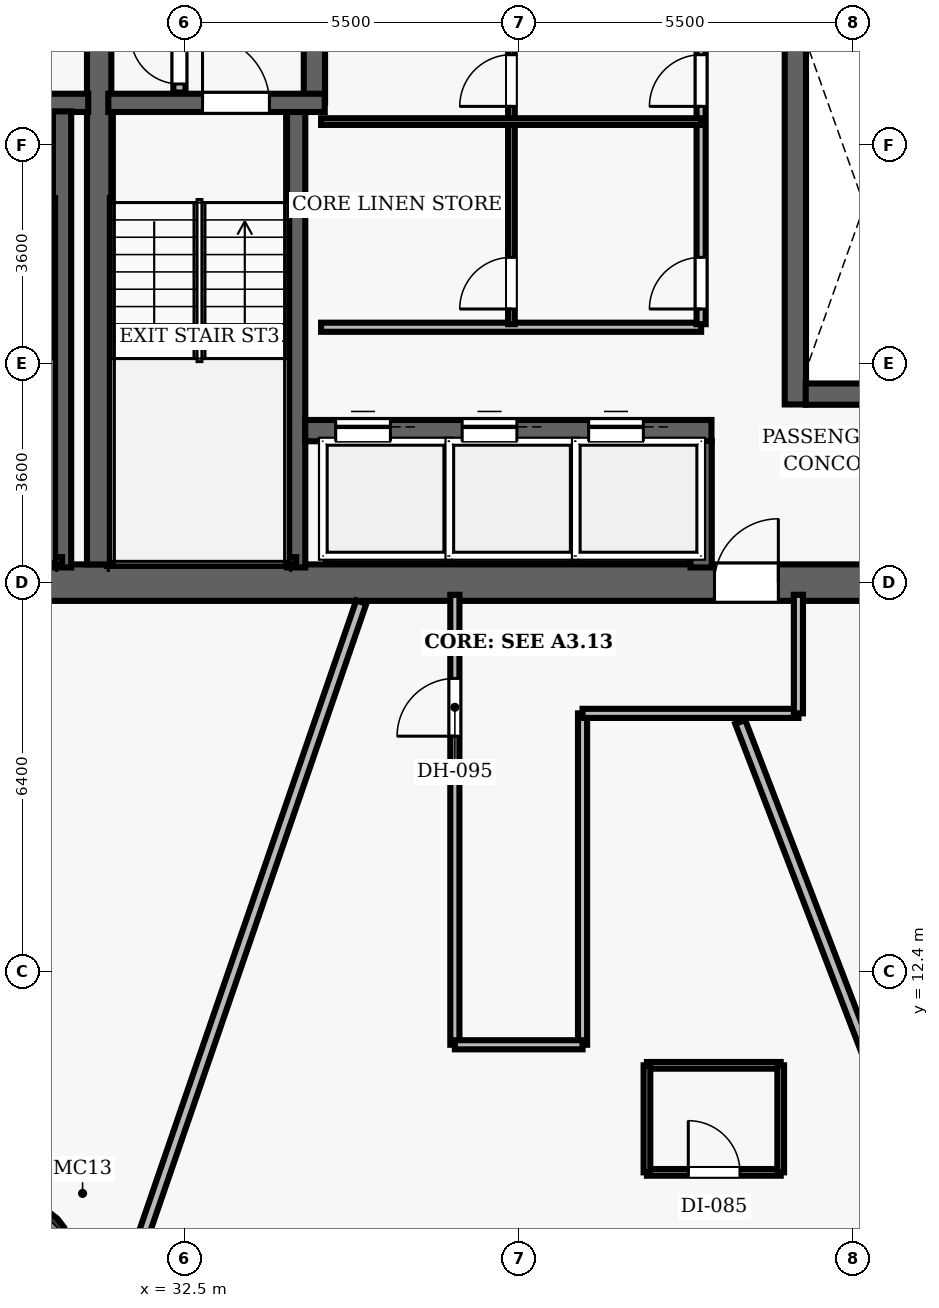
"""IFC4 building model, lengths in metres.
Left out: names, types, materials, properties, quantities, classifications, styles, units other than length and angle.
Written with IfcOpenShell. Run it as: python <this file> out.ifc"""

import sys

from ifc_helpers import new_model, si_unit, direction, frame, frame_2d, origin, origin_2d, place, context, subcontext, project, spatial, rectangle, hollow_circle, extrude, element, fill, save


model = new_model("IFC4")
c1 = context("Model", 3, precision=1e-05, world=origin(), true_north=direction((0.0, 1.0)))
c2 = subcontext(c1, "Body", "Model", "MODEL_VIEW")
j1 = project(units=[si_unit("LENGTHUNIT", "METRE"), si_unit("PLANEANGLEUNIT", "RADIAN")], contexts=[c1])
p1 = place(None, origin())
s1 = spatial("IfcSite", under=j1, at=p1, CompositionType="ELEMENT")
p2 = place(p1, origin())
s2 = spatial("IfcBuilding", under=s1, at=p2, CompositionType="ELEMENT")
p3 = place(p2, frame((0.0, 0.0, 113.3)))
s3 = spatial("IfcBuildingStorey", under=s2, at=p3, CompositionType="ELEMENT", Elevation=113.3)
p4 = place(p3, frame((26.7, 18.8, 0.0), z_axis=(0.0, 0.0, 1.0), x_axis=(1.0, 0.0, 0.0)))
e1 = element("IfcWall", 1, at=p4, inside=s3, PredefinedType="SHEAR", context=c2, shape_type="SweptSolid", body=[
    extrude(rectangle(XDim=22.6, YDim=0.6, at=frame_2d((11.3, 0.0))), origin(), (0.0, 0.0, 1.0), 3.5),
])
p5 = place(p4, frame((14.52, 0.0, 0.0)))
e2 = element("IfcOpeningElement", 2, at=p5, cuts=e1, PredefinedType="OPENING", context=c2, shape_type="SweptSolid", body=[
    extrude(rectangle(XDim=1.05, YDim=2.15, at=frame_2d((0.525, 1.075))), frame((0.0, 0.31, 0.0), z_axis=(0.0, -1.0, 0.0), x_axis=(1.0, 0.0, 0.0)), (0.0, 0.0, 1.0), 0.62),
])
p6 = place(p3, frame((31.1, 19.1, 0.0), z_axis=(0.0, 0.0, 1.0), x_axis=(0.0, 1.0, 0.0)))
e3 = element("IfcWall", 3, at=p6, inside=s3, PredefinedType="SHEAR", context=c2, shape_type="SweptSolid", body=[
    extrude(rectangle(XDim=13.8, YDim=0.4, at=frame_2d((6.9, 0.0))), origin(), (0.0, 0.0, 1.0), 3.5),
])
p7 = place(p3, frame((29.917, 7.846, 0.0), z_axis=(0.0, 0.0, 1.0), x_axis=(1.0, 0.0, 0.0)))
e4 = element("IfcColumn", 4, at=p7, inside=s3, PredefinedType="COLUMN", context=c2, shape_type="SweptSolid", body=[
    extrude(hollow_circle(Radius=0.7, WallThickness=0.055, at=origin_2d()), origin(), (0.0, 0.0, 1.0), 3.5),
])
p8 = place(p3, frame((27.25, 26.69, 0.0), z_axis=(0.0, 0.0, 1.0), x_axis=(1.0, 0.0, 0.0)))
e5 = element("IfcWall", 5, at=p8, inside=s3, PredefinedType="SHEAR", context=c2, shape_type="SweptSolid", body=[
    extrude(rectangle(XDim=3.67, YDim=0.3, at=frame_2d((1.835, 0.0))), origin(), (0.0, 0.0, 1.0), 3.5),
])
p9 = place(p8, frame((1.05, 0.0, 0.0)))
e6 = element("IfcOpeningElement", 6, at=p9, cuts=e5, PredefinedType="OPENING", context=c2, shape_type="SweptSolid", body=[
    extrude(rectangle(XDim=1.1, YDim=2.15, at=frame_2d((0.55, 1.075))), frame((0.0, 0.16, 0.0), z_axis=(0.0, -1.0, 0.0), x_axis=(1.0, 0.0, 0.0)), (0.0, 0.0, 1.0), 0.32),
])
p10 = place(p3, frame((30.49, 19.05, 0.0), z_axis=(0.0, 0.0, 1.0), x_axis=(0.0, 1.0, 0.0)))
e7 = element("IfcWall", 7, at=p10, inside=s3, PredefinedType="SHEAR", context=c2, shape_type="SweptSolid", body=[
    extrude(rectangle(XDim=7.5, YDim=0.3, at=frame_2d((3.75, 0.0))), origin(), (0.0, 0.0, 1.0), 3.5),
])
p11 = place(p3, frame((27.395, 19.16, 0.0), z_axis=(0.0, 0.0, 1.0), x_axis=(1.0, 0.0, 0.0)))
e8 = element("IfcWall", 8, at=p11, inside=s3, PredefinedType="SHEAR", context=c2, shape_type="SweptSolid", body=[
    extrude(rectangle(XDim=3.095, YDim=0.12, at=frame_2d((1.547, 0.0))), origin(), (0.0, 0.0, 1.0), 3.5),
])
p12 = place(p3, frame((34.34, 19.05, 0.0), z_axis=(0.0, 0.0, 1.0), x_axis=(0.0, 1.0, 0.0)))
e9 = element("IfcWall", 9, at=p12, inside=s3, PredefinedType="SHEAR", context=c2, shape_type="SweptSolid", body=[
    extrude(rectangle(XDim=7.5, YDim=0.3, at=frame_2d((3.75, 0.0))), origin(), (0.0, 0.0, 1.0), 3.5),
])
p13 = place(p3, frame((34.64, 26.69, 0.0), z_axis=(0.0, 0.0, 1.0), x_axis=(0.0, 1.0, 0.0)))
e10 = element("IfcWall", 10, at=p13, inside=s3, PredefinedType="SHEAR", context=c2, shape_type="SweptSolid", body=[
    extrude(rectangle(XDim=6.26, YDim=0.35, at=frame_2d((3.13, 0.0))), origin(), (0.0, 0.0, 1.0), 3.5),
])
p14 = place(p3, frame((31.25, 26.69, 0.0), z_axis=(0.0, 0.0, 1.0), x_axis=(1.0, 0.0, 0.0)))
e11 = element("IfcWall", 11, at=p14, inside=s3, PredefinedType="SHEAR", context=c2, shape_type="SweptSolid", body=[
    extrude(rectangle(XDim=3.56, YDim=0.3, at=frame_2d((1.78, 0.0))), origin(), (0.0, 0.0, 1.0), 3.5),
])
p15 = place(p14, frame((1.55, 0.0, 0.0)))
e12 = element("IfcOpeningElement", 12, at=p15, cuts=e11, PredefinedType="OPENING", context=c2, shape_type="SweptSolid", body=[
    extrude(rectangle(XDim=1.1, YDim=2.15, at=frame_2d((0.55, 1.075))), frame((0.0, 0.16, 0.0), z_axis=(0.0, -1.0, 0.0), x_axis=(1.0, 0.0, 0.0)), (0.0, 0.0, 1.0), 0.32),
])
p16 = place(p3, frame((31.3, 19.16, 0.0), z_axis=(0.0, 0.0, 1.0), x_axis=(1.0, 0.0, 0.0)))
e13 = element("IfcWall", 13, at=p16, inside=s3, PredefinedType="SHEAR", context=c2, shape_type="SweptSolid", body=[
    extrude(rectangle(XDim=3.04, YDim=0.12, at=frame_2d((1.52, 0.0))), origin(), (0.0, 0.0, 1.0), 3.5),
])
p17 = place(p3, frame((32.42, 26.86, 0.0), z_axis=(0.0, 0.0, 1.0), x_axis=(0.0, 1.0, 0.0)))
e14 = element("IfcWall", 14, at=p17, inside=s3, PredefinedType="PARTITIONING", context=c2, shape_type="SweptSolid", body=[
    extrude(rectangle(XDim=2.04, YDim=0.2, at=frame_2d((1.02, 0.0))), origin(), (0.0, 0.0, 1.0), 2.675),
])
p18 = place(p17, frame((0.14, 0.0, 0.0)))
e15 = element("IfcOpeningElement", 15, at=p18, cuts=e14, PredefinedType="OPENING", context=c2, shape_type="SweptSolid", body=[
    extrude(rectangle(XDim=0.8, YDim=2.05, at=frame_2d((0.4, 1.025))), frame((0.0, 0.11, 0.0), z_axis=(0.0, -1.0, 0.0), x_axis=(1.0, 0.0, 0.0)), (0.0, 0.0, 1.0), 0.22),
])
p19 = place(p3, frame((42.55, 21.73, 0.0), z_axis=(0.0, 0.0, 1.0), x_axis=(0.0, 1.0, 0.0)))
e16 = element("IfcWall", 16, at=p19, inside=s3, PredefinedType="SHEAR", context=c2, shape_type="SweptSolid", body=[
    extrude(rectangle(XDim=6.54, YDim=0.35, at=frame_2d((3.27, 0.0))), origin(), (0.0, 0.0, 1.0), 2.675),
])
p20 = place(p3, frame((42.72, 21.9, 0.0), z_axis=(0.0, 0.0, 1.0), x_axis=(1.0, 0.0, 0.0)))
e17 = element("IfcWall", 17, at=p20, inside=s3, PredefinedType="SHEAR", context=c2, shape_type="SweptSolid", body=[
    extrude(rectangle(XDim=2.03, YDim=0.35, at=frame_2d((1.015, 0.0))), origin(), (0.0, 0.0, 1.0), 2.675),
])
p21 = place(p3, frame((34.49, 21.3, 0.0), z_axis=(0.0, 0.0, 1.0), x_axis=(1.0, 0.0, 0.0)))
e18 = element("IfcWall", 18, at=p21, inside=s3, PredefinedType="SHEAR", context=c2, shape_type="SweptSolid", body=[
    extrude(rectangle(XDim=6.68, YDim=0.35, at=frame_2d((3.34, 0.0))), origin(), (0.0, 0.0, 1.0), 2.675),
])
p22 = place(p21, frame((0.5, 0.0, 0.0)))
e19 = element("IfcOpeningElement", 19, at=p22, cuts=e18, PredefinedType="OPENING", context=c2, shape_type="SweptSolid", body=[
    extrude(rectangle(XDim=0.9, YDim=2.15, at=frame_2d((0.45, 1.075))), frame((0.0, 0.185, 0.0), z_axis=(0.0, -1.0, 0.0), x_axis=(1.0, 0.0, 0.0)), (0.0, 0.0, 1.0), 0.37),
])
p23 = place(p21, frame((2.58, 0.0, 0.0)))
e20 = element("IfcOpeningElement", 20, at=p23, cuts=e18, PredefinedType="OPENING", context=c2, shape_type="SweptSolid", body=[
    extrude(rectangle(XDim=0.9, YDim=2.15, at=frame_2d((0.45, 1.075))), frame((0.0, 0.185, 0.0), z_axis=(0.0, -1.0, 0.0), x_axis=(1.0, 0.0, 0.0)), (0.0, 0.0, 1.0), 0.37),
])
p24 = place(p21, frame((4.66, 0.0, 0.0)))
e21 = element("IfcOpeningElement", 21, at=p24, cuts=e18, PredefinedType="OPENING", context=c2, shape_type="SweptSolid", body=[
    extrude(rectangle(XDim=0.9, YDim=2.15, at=frame_2d((0.45, 1.075))), frame((0.0, 0.185, 0.0), z_axis=(0.0, -1.0, 0.0), x_axis=(1.0, 0.0, 0.0)), (0.0, 0.0, 1.0), 0.37),
])
p25 = place(p3, frame((41.0, 19.05, 0.0), z_axis=(0.0, 0.0, 1.0), x_axis=(0.0, 1.0, 0.0)))
e22 = element("IfcWall", 22, at=p25, inside=s3, PredefinedType="SHEAR", context=c2, shape_type="SweptSolid", body=[
    extrude(rectangle(XDim=2.08, YDim=0.35, at=frame_2d((1.04, 0.0))), origin(), (0.0, 0.0, 1.0), 2.675),
])
p26 = place(p3, frame((34.75, 23.0, 0.0), z_axis=(0.0, 0.0, 1.0), x_axis=(1.0, 0.0, 0.0)))
e23 = element("IfcWall", 23, at=p26, inside=s3, PredefinedType="PARTITIONING", context=c2, shape_type="SweptSolid", body=[
    extrude(rectangle(XDim=6.25, YDim=0.15, at=frame_2d((3.125, 0.0))), origin(), (0.0, 0.0, 1.0), 2.675),
])
p27 = place(p3, frame((41.0, 23.05, 0.0), z_axis=(0.0, 0.0, 1.0), x_axis=(0.0, 1.0, 0.0)))
e24 = element("IfcWall", 24, at=p27, inside=s3, PredefinedType="PARTITIONING", context=c2, shape_type="SweptSolid", body=[
    extrude(rectangle(XDim=9.8, YDim=0.15, at=frame_2d((4.9, 0.0))), origin(), (0.0, 0.0, 1.0), 2.675),
])
p28 = place(p27, frame((0.25, 0.0, 0.0)))
e25 = element("IfcOpeningElement", 25, at=p28, cuts=e24, PredefinedType="OPENING", context=c2, shape_type="SweptSolid", body=[
    extrude(rectangle(XDim=0.85, YDim=2.1, at=frame_2d((0.425, 1.05))), frame((0.0, 0.085, 0.0), z_axis=(0.0, -1.0, 0.0), x_axis=(1.0, 0.0, 0.0)), (0.0, 0.0, 1.0), 0.17),
])
p29 = place(p27, frame((3.582, 0.0, 0.0)))
e26 = element("IfcOpeningElement", 26, at=p29, cuts=e24, PredefinedType="OPENING", context=c2, shape_type="SweptSolid", body=[
    extrude(rectangle(XDim=0.85, YDim=2.1, at=frame_2d((0.425, 1.05))), frame((0.0, 0.085, 0.0), z_axis=(0.0, -1.0, 0.0), x_axis=(1.0, 0.0, 0.0)), (0.0, 0.0, 1.0), 0.17),
])
p30 = place(p27, frame((6.816, 0.0, 0.0)))
e27 = element("IfcOpeningElement", 27, at=p30, cuts=e24, PredefinedType="OPENING", context=c2, shape_type="SweptSolid", body=[
    extrude(rectangle(XDim=0.85, YDim=2.1, at=frame_2d((0.425, 1.05))), frame((0.0, 0.085, 0.0), z_axis=(0.0, -1.0, 0.0), x_axis=(1.0, 0.0, 0.0)), (0.0, 0.0, 1.0), 0.17),
])
p31 = place(p3, frame((37.88, 23.05, 0.0), z_axis=(0.0, 0.0, 1.0), x_axis=(0.0, 1.0, 0.0)))
e28 = element("IfcWall", 28, at=p31, inside=s3, PredefinedType="PARTITIONING", context=c2, shape_type="SweptSolid", body=[
    extrude(rectangle(XDim=9.8, YDim=0.11, at=frame_2d((4.9, 0.0))), origin(), (0.0, 0.0, 1.0), 2.675),
])
p32 = place(p31, frame((0.25, 0.0, 0.0)))
e29 = element("IfcOpeningElement", 29, at=p32, cuts=e28, PredefinedType="OPENING", context=c2, shape_type="SweptSolid", body=[
    extrude(rectangle(XDim=0.85, YDim=2.1, at=frame_2d((0.425, 1.05))), frame((0.0, 0.065, 0.0), z_axis=(0.0, -1.0, 0.0), x_axis=(1.0, 0.0, 0.0)), (0.0, 0.0, 1.0), 0.13),
])
p33 = place(p31, frame((3.582, 0.0, 0.0)))
e30 = element("IfcOpeningElement", 30, at=p33, cuts=e28, PredefinedType="OPENING", context=c2, shape_type="SweptSolid", body=[
    extrude(rectangle(XDim=0.85, YDim=2.1, at=frame_2d((0.425, 1.05))), frame((0.0, 0.065, 0.0), z_axis=(0.0, -1.0, 0.0), x_axis=(1.0, 0.0, 0.0)), (0.0, 0.0, 1.0), 0.13),
])
p34 = place(p31, frame((6.816, 0.0, 0.0)))
e31 = element("IfcOpeningElement", 31, at=p34, cuts=e28, PredefinedType="OPENING", context=c2, shape_type="SweptSolid", body=[
    extrude(rectangle(XDim=0.85, YDim=2.1, at=frame_2d((0.425, 1.05))), frame((0.0, 0.065, 0.0), z_axis=(0.0, -1.0, 0.0), x_axis=(1.0, 0.0, 0.0)), (0.0, 0.0, 1.0), 0.13),
])
p35 = place(p3, frame((34.75, 26.382, 0.0), z_axis=(0.0, 0.0, 1.0), x_axis=(1.0, 0.0, 0.0)))
e32 = element("IfcWall", 32, at=p35, inside=s3, PredefinedType="PARTITIONING", context=c2, shape_type="SweptSolid", body=[
    extrude(rectangle(XDim=6.25, YDim=0.11, at=frame_2d((3.125, 0.0))), origin(), (0.0, 0.0, 1.0), 2.675),
])
p36 = place(p3, frame((36.95, 11.2, 0.0), z_axis=(0.0, 0.0, 1.0), x_axis=(0.0, 1.0, 0.0)))
e33 = element("IfcWall", 33, at=p36, inside=s3, PredefinedType="PARTITIONING", context=c2, shape_type="SweptSolid", body=[
    extrude(rectangle(XDim=7.4, YDim=0.15, at=frame_2d((3.7, 0.0))), origin(), (0.0, 0.0, 1.0), 2.675),
])
p37 = place(p36, frame((5.075, 0.0, 0.0)))
e34 = element("IfcOpeningElement", 34, at=p37, cuts=e33, PredefinedType="OPENING", context=c2, shape_type="SweptSolid", body=[
    extrude(rectangle(XDim=0.95, YDim=2.15, at=frame_2d((0.475, 1.075))), frame((0.0, 0.085, 0.0), z_axis=(0.0, -1.0, 0.0), x_axis=(1.0, 0.0, 0.0)), (0.0, 0.0, 1.0), 0.17),
])
p38 = place(p3, frame((39.05, 11.2, 0.0), z_axis=(0.0, 0.0, 1.0), x_axis=(0.0, 1.0, 0.0)))
e35 = element("IfcWall", 35, at=p38, inside=s3, PredefinedType="PARTITIONING", context=c2, shape_type="SweptSolid", body=[
    extrude(rectangle(XDim=5.45, YDim=0.15, at=frame_2d((2.725, 0.0))), origin(), (0.0, 0.0, 1.0), 2.675),
])
p39 = place(p3, frame((39.05, 16.65, 0.0), z_axis=(0.0, 0.0, 1.0), x_axis=(1.0, 0.0, 0.0)))
e36 = element("IfcWall", 36, at=p39, inside=s3, PredefinedType="PARTITIONING", context=c2, shape_type="SweptSolid", body=[
    extrude(rectangle(XDim=3.55, YDim=0.15, at=frame_2d((1.775, 0.0))), origin(), (0.0, 0.0, 1.0), 2.675),
])
p40 = place(p3, frame((42.6, 16.65, 0.0), z_axis=(0.0, 0.0, 1.0), x_axis=(0.0, 1.0, 0.0)))
e37 = element("IfcWall", 37, at=p40, inside=s3, PredefinedType="PARTITIONING", context=c2, shape_type="SweptSolid", body=[
    extrude(rectangle(XDim=1.95, YDim=0.15, at=frame_2d((0.975, 0.0))), origin(), (0.0, 0.0, 1.0), 2.675),
])
p41 = place(p3, frame((36.95, 11.2, 0.0), z_axis=(0.0, 0.0, 1.0), x_axis=(1.0, 0.0, 0.0)))
e38 = element("IfcWall", 38, at=p41, inside=s3, PredefinedType="PARTITIONING", context=c2, shape_type="SweptSolid", body=[
    extrude(rectangle(XDim=2.1, YDim=0.15, at=frame_2d((1.05, 0.0))), origin(), (0.0, 0.0, 1.0), 2.675),
])
p42 = place(p3, frame((35.411, 18.48, 0.0), z_axis=(0.0, 0.0, 1.0), x_axis=(-0.325564767914, -0.945519741673, 0.0)))
e39 = element("IfcWall", 39, at=p42, inside=s3, PredefinedType="PARTITIONING", context=c2, shape_type="SweptSolid", body=[
    extrude(rectangle(XDim=14.981, YDim=0.175, at=frame_2d((7.491, 0.0))), origin(), (0.0, 0.0, 1.0), 2.675),
])
p43 = place(p3, frame((41.643, 16.51, 0.0), z_axis=(0.0, 0.0, 1.0), x_axis=(0.358375658047, -0.933577467444, 0.0)))
e40 = element("IfcWall", 40, at=p43, inside=s3, PredefinedType="PARTITIONING", context=c2, shape_type="SweptSolid", body=[
    extrude(rectangle(XDim=13.612, YDim=0.175, at=frame_2d((6.806, 0.0))), origin(), (0.0, 0.0, 1.0), 2.675),
])
p44 = place(p3, frame((40.109, 9.102, 0.0), z_axis=(0.0, 0.0, 1.0), x_axis=(1.0, 0.0, 0.0)))
e41 = element("IfcWall", 41, at=p44, inside=s3, PredefinedType="PARTITIONING", context=c2, shape_type="SweptSolid", body=[
    extrude(rectangle(XDim=2.2, YDim=0.11, at=frame_2d((1.1, 0.0))), origin(), (0.0, 0.0, 1.0), 2.675),
])
p45 = place(p44, frame((0.68, 0.0, 0.0)))
e42 = element("IfcOpeningElement", 42, at=p45, cuts=e41, PredefinedType="OPENING", context=c2, shape_type="SweptSolid", body=[
    extrude(rectangle(XDim=0.85, YDim=2.1, at=frame_2d((0.425, 1.05))), frame((0.0, 0.065, 0.0), z_axis=(0.0, -1.0, 0.0), x_axis=(1.0, 0.0, 0.0)), (0.0, 0.0, 1.0), 0.13),
])
p46 = place(p3, frame((40.109, 10.862, 0.0), z_axis=(0.0, 0.0, 1.0), x_axis=(1.0, 0.0, 0.0)))
e43 = element("IfcWall", 43, at=p46, inside=s3, PredefinedType="PARTITIONING", context=c2, shape_type="SweptSolid", body=[
    extrude(rectangle(XDim=2.2, YDim=0.11, at=frame_2d((1.1, 0.0))), origin(), (0.0, 0.0, 1.0), 2.675),
])
for number, where, z_axis, x_axis in (
    (44, (40.109, 9.102, 0.0), (0.0, 0.0, 1.0), (0.0, 1.0, 0.0)),
    (45, (42.309, 9.102, 0.0), (0.0, 0.0, 1.0), (0.0, 1.0, 0.0)),
):
    element("IfcWall", number, at=place(p3, frame(where, z_axis=z_axis, x_axis=x_axis)), inside=s3, PredefinedType="PARTITIONING", context=c2, shape_type="SweptSolid", body=[
        extrude(rectangle(XDim=1.76, YDim=0.11, at=frame_2d((0.88, 0.0))), origin(), (0.0, 0.0, 1.0), 2.675),
    ])
p47 = place(p15, origin())
e46 = element("IfcDoor", 46, at=p47, inside=s3, OperationType="SINGLE_SWING_LEFT", PredefinedType="DOOR", context=c2, shape_type="SweptSolid", body=[
    extrude(rectangle(XDim=1.1, YDim=2.15, at=frame_2d((0.55, 1.075))), frame((0.0, 0.025, 0.0), z_axis=(0.0, -1.0, 0.0), x_axis=(1.0, 0.0, 0.0)), (0.0, 0.0, 1.0), 0.05),
])
fill(e12, e46)
p48 = place(p18, origin())
e47 = element("IfcDoor", 47, at=p48, inside=s3, OperationType="SINGLE_SWING_RIGHT", PredefinedType="DOOR", context=c2, shape_type="SweptSolid", body=[
    extrude(rectangle(XDim=0.8, YDim=2.05, at=frame_2d((0.4, 1.025))), frame((0.0, 0.025, 0.0), z_axis=(0.0, -1.0, 0.0), x_axis=(1.0, 0.0, 0.0)), (0.0, 0.0, 1.0), 0.05),
])
fill(e15, e47)
p49 = place(p5, origin())
e48 = element("IfcDoor", 48, at=p49, inside=s3, OperationType="SINGLE_SWING_RIGHT", PredefinedType="DOOR", context=c2, shape_type="SweptSolid", body=[
    extrude(rectangle(XDim=1.05, YDim=2.15, at=frame_2d((0.525, 1.075))), frame((0.0, 0.025, 0.0), z_axis=(0.0, -1.0, 0.0), x_axis=(1.0, 0.0, 0.0)), (0.0, 0.0, 1.0), 0.05),
])
fill(e2, e48)
p50 = place(p28, origin())
e49 = element("IfcDoor", 49, at=p50, inside=s3, OperationType="SINGLE_SWING_LEFT", PredefinedType="DOOR", context=c2, shape_type="SweptSolid", body=[
    extrude(rectangle(XDim=0.85, YDim=2.1, at=frame_2d((0.425, 1.05))), frame((0.0, 0.025, 0.0), z_axis=(0.0, -1.0, 0.0), x_axis=(1.0, 0.0, 0.0)), (0.0, 0.0, 1.0), 0.05),
])
fill(e25, e49)
p51 = place(p32, origin())
e50 = element("IfcDoor", 50, at=p51, inside=s3, OperationType="SINGLE_SWING_LEFT", PredefinedType="DOOR", context=c2, shape_type="SweptSolid", body=[
    extrude(rectangle(XDim=0.85, YDim=2.1, at=frame_2d((0.425, 1.05))), frame((0.0, 0.025, 0.0), z_axis=(0.0, -1.0, 0.0), x_axis=(1.0, 0.0, 0.0)), (0.0, 0.0, 1.0), 0.05),
])
fill(e29, e50)
p52 = place(p29, origin())
e51 = element("IfcDoor", 51, at=p52, inside=s3, OperationType="SINGLE_SWING_LEFT", PredefinedType="DOOR", context=c2, shape_type="SweptSolid", body=[
    extrude(rectangle(XDim=0.85, YDim=2.1, at=frame_2d((0.425, 1.05))), frame((0.0, 0.025, 0.0), z_axis=(0.0, -1.0, 0.0), x_axis=(1.0, 0.0, 0.0)), (0.0, 0.0, 1.0), 0.05),
])
fill(e26, e51)
p53 = place(p33, origin())
e52 = element("IfcDoor", 52, at=p53, inside=s3, OperationType="SINGLE_SWING_LEFT", PredefinedType="DOOR", context=c2, shape_type="SweptSolid", body=[
    extrude(rectangle(XDim=0.85, YDim=2.1, at=frame_2d((0.425, 1.05))), frame((0.0, 0.025, 0.0), z_axis=(0.0, -1.0, 0.0), x_axis=(1.0, 0.0, 0.0)), (0.0, 0.0, 1.0), 0.05),
])
fill(e30, e52)
p54 = place(p37, origin())
e53 = element("IfcDoor", 53, at=p54, inside=s3, OperationType="SINGLE_SWING_LEFT", PredefinedType="DOOR", context=c2, shape_type="SweptSolid", body=[
    extrude(rectangle(XDim=0.95, YDim=2.15, at=frame_2d((0.475, 1.075))), frame((0.0, 0.025, 0.0), z_axis=(0.0, -1.0, 0.0), x_axis=(1.0, 0.0, 0.0)), (0.0, 0.0, 1.0), 0.05),
])
fill(e34, e53)
p55 = place(p45, origin())
e54 = element("IfcDoor", 54, at=p55, inside=s3, OperationType="SINGLE_SWING_LEFT", PredefinedType="DOOR", context=c2, shape_type="SweptSolid", body=[
    extrude(rectangle(XDim=0.85, YDim=2.1, at=frame_2d((0.425, 1.05))), frame((0.0, 0.025, 0.0), z_axis=(0.0, -1.0, 0.0), x_axis=(1.0, 0.0, 0.0)), (0.0, 0.0, 1.0), 0.05),
])
fill(e42, e54)
p56 = place(p22, origin())
e55 = element("IfcDoor", 55, at=p56, inside=s3, OperationType="SLIDING_TO_LEFT", PredefinedType="DOOR", context=c2, shape_type="SweptSolid", body=[
    extrude(rectangle(XDim=0.9, YDim=2.15, at=frame_2d((0.45, 1.075))), frame((0.0, 0.025, 0.0), z_axis=(0.0, -1.0, 0.0), x_axis=(1.0, 0.0, 0.0)), (0.0, 0.0, 1.0), 0.05),
])
fill(e19, e55)
p57 = place(p23, origin())
e56 = element("IfcDoor", 56, at=p57, inside=s3, OperationType="SLIDING_TO_LEFT", PredefinedType="DOOR", context=c2, shape_type="SweptSolid", body=[
    extrude(rectangle(XDim=0.9, YDim=2.15, at=frame_2d((0.45, 1.075))), frame((0.0, 0.025, 0.0), z_axis=(0.0, -1.0, 0.0), x_axis=(1.0, 0.0, 0.0)), (0.0, 0.0, 1.0), 0.05),
])
fill(e20, e56)
p58 = place(p24, origin())
e57 = element("IfcDoor", 57, at=p58, inside=s3, OperationType="SLIDING_TO_LEFT", PredefinedType="DOOR", context=c2, shape_type="SweptSolid", body=[
    extrude(rectangle(XDim=0.9, YDim=2.15, at=frame_2d((0.45, 1.075))), frame((0.0, 0.025, 0.0), z_axis=(0.0, -1.0, 0.0), x_axis=(1.0, 0.0, 0.0)), (0.0, 0.0, 1.0), 0.05),
])
fill(e21, e57)
save(model, sys.argv[1])
